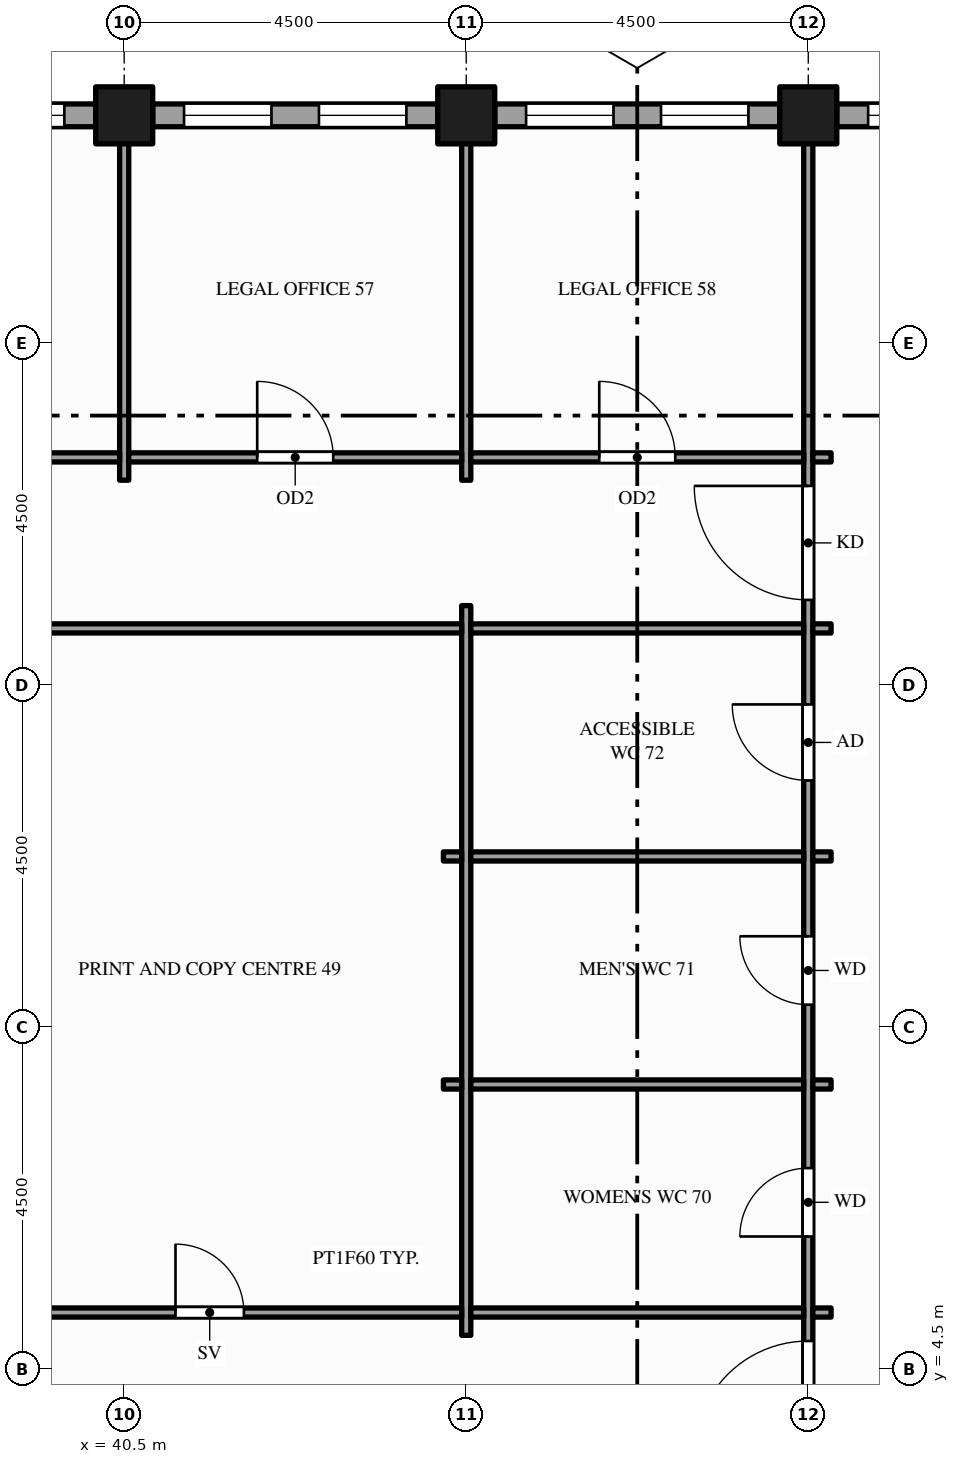
"""IFC4 building model, lengths in metres.
Left out: names, types, materials, properties, quantities, classifications, styles, units other than length and angle.
Written with IfcOpenShell. Run it as: python <this file> out.ifc"""

import sys

from ifc_helpers import new_model, si_unit, direction, frame, frame_2d, origin, origin_2d, place, context, subcontext, project, spatial, rectangle, hollow_rectangle, extrude, element, fill, save


model = new_model("IFC4")
c1 = context("Model", 3, precision=1e-05, world=origin(), true_north=direction((0.0, 1.0)))
c2 = subcontext(c1, "Body", "Model", "MODEL_VIEW")
j1 = project(units=[si_unit("LENGTHUNIT", "METRE"), si_unit("PLANEANGLEUNIT", "RADIAN")], contexts=[c1])
p1 = place(None, origin())
s1 = spatial("IfcSite", under=j1, at=p1, CompositionType="ELEMENT")
p2 = place(p1, origin())
s2 = spatial("IfcBuilding", under=s1, at=p2, CompositionType="ELEMENT")
p3 = place(p2, frame((0.0, 0.0, 223.0)))
s3 = spatial("IfcBuildingStorey", under=s2, at=p3, CompositionType="ELEMENT", Elevation=223.0)
for number, where, z_axis, x_axis in (
    (1, (40.5, 21.0, -0.15), (0.0, 0.0, 1.0), (1.0, 0.0, 0.0)),
    (2, (45.0, 21.0, -0.15), (0.0, 0.0, 1.0), (1.0, 0.0, 0.0)),
    (3, (49.5, 21.0, -0.15), (0.0, 0.0, 1.0), (1.0, 0.0, 0.0)),
):
    element("IfcColumn", number, at=place(p3, frame(where, z_axis=z_axis, x_axis=x_axis)), inside=s3, PredefinedType="COLUMN", context=c2, shape_type="SweptSolid", body=[
        extrude(hollow_rectangle(XDim=0.75, YDim=0.75, WallThickness=0.036, at=origin_2d()), origin(), (0.0, 0.0, 1.0), 4.0),
    ])
p4 = place(p3, frame((54.0, 21.0, 0.0), z_axis=(0.0, 0.0, 1.0), x_axis=(-1.0, 0.0, 0.0)))
e4 = element("IfcWall", 4, at=p4, inside=s3, PredefinedType="STANDARD", context=c2, shape_type="SweptSolid", body=[
    extrude(rectangle(XDim=4.125, YDim=0.3, at=frame_2d((2.062, 0.0))), origin(), (0.0, 0.0, 1.0), 2.87),
])
p5 = place(p4, frame((0.4, 0.0, 0.9)))
e5 = element("IfcOpeningElement", 5, at=p5, cuts=e4, PredefinedType="OPENING", context=c2, shape_type="SweptSolid", body=[
    extrude(rectangle(XDim=1.55, YDim=1.75, at=frame_2d((0.775, 0.875))), frame((0.0, 0.16, 0.0), z_axis=(0.0, -1.0, 0.0), x_axis=(1.0, 0.0, 0.0)), (0.0, 0.0, 1.0), 0.32),
])
p6 = place(p4, frame((2.562, 0.0, 0.9)))
e6 = element("IfcOpeningElement", 6, at=p6, cuts=e4, PredefinedType="OPENING", context=c2, shape_type="SweptSolid", body=[
    extrude(rectangle(XDim=1.15, YDim=1.75, at=frame_2d((0.575, 0.875))), frame((0.0, 0.16, 0.0), z_axis=(0.0, -1.0, 0.0), x_axis=(1.0, 0.0, 0.0)), (0.0, 0.0, 1.0), 0.32),
])
p7 = place(p3, frame((49.125, 21.0, 0.0), z_axis=(0.0, 0.0, 1.0), x_axis=(-1.0, 0.0, 0.0)))
e7 = element("IfcWall", 7, at=p7, inside=s3, PredefinedType="STANDARD", context=c2, shape_type="SweptSolid", body=[
    extrude(rectangle(XDim=3.75, YDim=0.3, at=frame_2d((1.875, 0.0))), origin(), (0.0, 0.0, 1.0), 2.87),
])
p8 = place(p7, frame((0.413, 0.0, 0.9)))
e8 = element("IfcOpeningElement", 8, at=p8, cuts=e7, PredefinedType="OPENING", context=c2, shape_type="SweptSolid", body=[
    extrude(rectangle(XDim=1.15, YDim=1.75, at=frame_2d((0.575, 0.875))), frame((0.0, 0.16, 0.0), z_axis=(0.0, -1.0, 0.0), x_axis=(1.0, 0.0, 0.0)), (0.0, 0.0, 1.0), 0.32),
])
p9 = place(p7, frame((2.188, 0.0, 0.9)))
e9 = element("IfcOpeningElement", 9, at=p9, cuts=e7, PredefinedType="OPENING", context=c2, shape_type="SweptSolid", body=[
    extrude(rectangle(XDim=1.15, YDim=1.75, at=frame_2d((0.575, 0.875))), frame((0.0, 0.16, 0.0), z_axis=(0.0, -1.0, 0.0), x_axis=(1.0, 0.0, 0.0)), (0.0, 0.0, 1.0), 0.32),
])
p10 = place(p3, frame((44.625, 21.0, 0.0), z_axis=(0.0, 0.0, 1.0), x_axis=(-1.0, 0.0, 0.0)))
e10 = element("IfcWall", 10, at=p10, inside=s3, PredefinedType="STANDARD", context=c2, shape_type="SweptSolid", body=[
    extrude(rectangle(XDim=3.75, YDim=0.3, at=frame_2d((1.875, 0.0))), origin(), (0.0, 0.0, 1.0), 2.87),
])
p11 = place(p10, frame((0.413, 0.0, 0.9)))
e11 = element("IfcOpeningElement", 11, at=p11, cuts=e10, PredefinedType="OPENING", context=c2, shape_type="SweptSolid", body=[
    extrude(rectangle(XDim=1.15, YDim=1.75, at=frame_2d((0.575, 0.875))), frame((0.0, 0.16, 0.0), z_axis=(0.0, -1.0, 0.0), x_axis=(1.0, 0.0, 0.0)), (0.0, 0.0, 1.0), 0.32),
])
p12 = place(p10, frame((2.188, 0.0, 0.9)))
e12 = element("IfcOpeningElement", 12, at=p12, cuts=e10, PredefinedType="OPENING", context=c2, shape_type="SweptSolid", body=[
    extrude(rectangle(XDim=1.15, YDim=1.75, at=frame_2d((0.575, 0.875))), frame((0.0, 0.16, 0.0), z_axis=(0.0, -1.0, 0.0), x_axis=(1.0, 0.0, 0.0)), (0.0, 0.0, 1.0), 0.32),
])
p13 = place(p3, frame((40.125, 21.0, 0.0), z_axis=(0.0, 0.0, 1.0), x_axis=(-1.0, 0.0, 0.0)))
e13 = element("IfcWall", 13, at=p13, inside=s3, PredefinedType="STANDARD", context=c2, shape_type="SweptSolid", body=[
    extrude(rectangle(XDim=3.75, YDim=0.3, at=frame_2d((1.875, 0.0))), origin(), (0.0, 0.0, 1.0), 2.87),
])
p14 = place(p13, frame((0.413, 0.0, 0.9)))
e14 = element("IfcOpeningElement", 14, at=p14, cuts=e13, PredefinedType="OPENING", context=c2, shape_type="SweptSolid", body=[
    extrude(rectangle(XDim=1.15, YDim=1.75, at=frame_2d((0.575, 0.875))), frame((0.0, 0.16, 0.0), z_axis=(0.0, -1.0, 0.0), x_axis=(1.0, 0.0, 0.0)), (0.0, 0.0, 1.0), 0.32),
])
p15 = place(p13, frame((2.188, 0.0, 0.9)))
e15 = element("IfcOpeningElement", 15, at=p15, cuts=e13, PredefinedType="OPENING", context=c2, shape_type="SweptSolid", body=[
    extrude(rectangle(XDim=1.15, YDim=1.75, at=frame_2d((0.575, 0.875))), frame((0.0, 0.16, 0.0), z_axis=(0.0, -1.0, 0.0), x_axis=(1.0, 0.0, 0.0)), (0.0, 0.0, 1.0), 0.32),
])
p16 = place(p3, frame((40.5, 16.2, 0.0), z_axis=(0.0, 0.0, 1.0), x_axis=(0.0, 1.0, 0.0)))
e16 = element("IfcWall", 16, at=p16, inside=s3, PredefinedType="PARTITIONING", context=c2, shape_type="SweptSolid", body=[
    extrude(rectangle(XDim=4.65, YDim=0.12, at=frame_2d((2.325, 0.0))), origin(), (0.0, 0.0, 1.0), 2.87),
])
p17 = place(p3, frame((45.0, 4.95, 0.0), z_axis=(0.0, 0.0, 1.0), x_axis=(0.0, 1.0, 0.0)))
e17 = element("IfcWall", 17, at=p17, inside=s3, PredefinedType="PARTITIONING", context=c2, shape_type="SweptSolid", body=[
    extrude(rectangle(XDim=9.6, YDim=0.12, at=frame_2d((4.8, 0.0))), origin(), (0.0, 0.0, 1.0), 2.87),
])
p18 = place(p3, frame((45.0, 16.2, 0.0), z_axis=(0.0, 0.0, 1.0), x_axis=(0.0, 1.0, 0.0)))
e18 = element("IfcWall", 18, at=p18, inside=s3, PredefinedType="PARTITIONING", context=c2, shape_type="SweptSolid", body=[
    extrude(rectangle(XDim=4.65, YDim=0.12, at=frame_2d((2.325, 0.0))), origin(), (0.0, 0.0, 1.0), 2.87),
])
p19 = place(p3, frame((49.5, -1.35, 0.0), z_axis=(0.0, 0.0, 1.0), x_axis=(0.0, 1.0, 0.0)))
e19 = element("IfcWall", 19, at=p19, inside=s3, PredefinedType="PARTITIONING", context=c2, shape_type="SweptSolid", body=[
    extrude(rectangle(XDim=22.2, YDim=0.12, at=frame_2d((11.1, 0.0))), origin(), (0.0, 0.0, 1.0), 2.87),
])
p20 = place(p19, frame((4.725, 0.0, 0.0)))
e20 = element("IfcOpeningElement", 20, at=p20, cuts=e19, PredefinedType="OPENING", context=c2, shape_type="SweptSolid", body=[
    extrude(rectangle(XDim=1.5, YDim=2.1, at=frame_2d((0.75, 1.05))), frame((0.0, 0.07, 0.0), z_axis=(0.0, -1.0, 0.0), x_axis=(1.0, 0.0, 0.0)), (0.0, 0.0, 1.0), 0.14),
])
p21 = place(p19, frame((15.975, 0.0, 0.0)))
e21 = element("IfcOpeningElement", 21, at=p21, cuts=e19, PredefinedType="OPENING", context=c2, shape_type="SweptSolid", body=[
    extrude(rectangle(XDim=1.5, YDim=2.1, at=frame_2d((0.75, 1.05))), frame((0.0, 0.07, 0.0), z_axis=(0.0, -1.0, 0.0), x_axis=(1.0, 0.0, 0.0)), (0.0, 0.0, 1.0), 0.14),
])
p22 = place(p19, frame((7.6, 0.0, 0.0)))
e22 = element("IfcOpeningElement", 22, at=p22, cuts=e19, PredefinedType="OPENING", context=c2, shape_type="SweptSolid", body=[
    extrude(rectangle(XDim=0.9, YDim=2.1, at=frame_2d((0.45, 1.05))), frame((0.0, 0.07, 0.0), z_axis=(0.0, -1.0, 0.0), x_axis=(1.0, 0.0, 0.0)), (0.0, 0.0, 1.0), 0.14),
])
p23 = place(p19, frame((10.65, 0.0, 0.0)))
e23 = element("IfcOpeningElement", 23, at=p23, cuts=e19, PredefinedType="OPENING", context=c2, shape_type="SweptSolid", body=[
    extrude(rectangle(XDim=0.9, YDim=2.1, at=frame_2d((0.45, 1.05))), frame((0.0, 0.07, 0.0), z_axis=(0.0, -1.0, 0.0), x_axis=(1.0, 0.0, 0.0)), (0.0, 0.0, 1.0), 0.14),
])
p24 = place(p19, frame((13.6, 0.0, 0.0)))
e24 = element("IfcOpeningElement", 24, at=p24, cuts=e19, PredefinedType="OPENING", context=c2, shape_type="SweptSolid", body=[
    extrude(rectangle(XDim=1.0, YDim=2.1, at=frame_2d((0.5, 1.05))), frame((0.0, 0.07, 0.0), z_axis=(0.0, -1.0, 0.0), x_axis=(1.0, 0.0, 0.0)), (0.0, 0.0, 1.0), 0.14),
])
p25 = place(p3, frame((38.31, 5.25, 0.0), z_axis=(0.0, 0.0, 1.0), x_axis=(1.0, 0.0, 0.0)))
e25 = element("IfcWall", 25, at=p25, inside=s3, PredefinedType="PARTITIONING", context=c2, shape_type="SweptSolid", body=[
    extrude(rectangle(XDim=6.63, YDim=0.12, at=frame_2d((3.315, 0.0))), origin(), (0.0, 0.0, 1.0), 2.87),
])
p26 = place(p25, frame((2.865, 0.0, 0.0)))
e26 = element("IfcOpeningElement", 26, at=p26, cuts=e25, PredefinedType="OPENING", context=c2, shape_type="SweptSolid", body=[
    extrude(rectangle(XDim=0.9, YDim=2.1, at=frame_2d((0.45, 1.05))), frame((0.0, 0.07, 0.0), z_axis=(0.0, -1.0, 0.0), x_axis=(1.0, 0.0, 0.0)), (0.0, 0.0, 1.0), 0.14),
])
p27 = place(p3, frame((45.06, 5.25, 0.0), z_axis=(0.0, 0.0, 1.0), x_axis=(1.0, 0.0, 0.0)))
e27 = element("IfcWall", 27, at=p27, inside=s3, PredefinedType="PARTITIONING", context=c2, shape_type="SweptSolid", body=[
    extrude(rectangle(XDim=4.38, YDim=0.12, at=frame_2d((2.19, 0.0))), origin(), (0.0, 0.0, 1.0), 2.87),
])
for number, where, z_axis, x_axis in (
    (28, (49.56, 5.25, 0.0), (0.0, 0.0, 1.0), (1.0, 0.0, 0.0)),
    (29, (44.7, 8.25, 0.0), (0.0, 0.0, 1.0), (1.0, 0.0, 0.0)),
):
    element("IfcWall", number, at=place(p3, frame(where, z_axis=z_axis, x_axis=x_axis)), inside=s3, PredefinedType="PARTITIONING", context=c2, shape_type="SweptSolid", body=[
        extrude(rectangle(XDim=0.24, YDim=0.12, at=frame_2d((0.12, 0.0))), origin(), (0.0, 0.0, 1.0), 2.87),
    ])
p28 = place(p3, frame((45.06, 8.25, 0.0), z_axis=(0.0, 0.0, 1.0), x_axis=(1.0, 0.0, 0.0)))
e30 = element("IfcWall", 30, at=p28, inside=s3, PredefinedType="PARTITIONING", context=c2, shape_type="SweptSolid", body=[
    extrude(rectangle(XDim=4.38, YDim=0.12, at=frame_2d((2.19, 0.0))), origin(), (0.0, 0.0, 1.0), 2.87),
])
for number, where, z_axis, x_axis in (
    (31, (49.56, 8.25, 0.0), (0.0, 0.0, 1.0), (1.0, 0.0, 0.0)),
    (32, (44.7, 11.25, 0.0), (0.0, 0.0, 1.0), (1.0, 0.0, 0.0)),
):
    element("IfcWall", number, at=place(p3, frame(where, z_axis=z_axis, x_axis=x_axis)), inside=s3, PredefinedType="PARTITIONING", context=c2, shape_type="SweptSolid", body=[
        extrude(rectangle(XDim=0.24, YDim=0.12, at=frame_2d((0.12, 0.0))), origin(), (0.0, 0.0, 1.0), 2.87),
    ])
p29 = place(p3, frame((45.06, 11.25, 0.0), z_axis=(0.0, 0.0, 1.0), x_axis=(1.0, 0.0, 0.0)))
e33 = element("IfcWall", 33, at=p29, inside=s3, PredefinedType="PARTITIONING", context=c2, shape_type="SweptSolid", body=[
    extrude(rectangle(XDim=4.38, YDim=0.12, at=frame_2d((2.19, 0.0))), origin(), (0.0, 0.0, 1.0), 2.87),
])
p30 = place(p3, frame((49.56, 11.25, 0.0), z_axis=(0.0, 0.0, 1.0), x_axis=(1.0, 0.0, 0.0)))
e34 = element("IfcWall", 34, at=p30, inside=s3, PredefinedType="PARTITIONING", context=c2, shape_type="SweptSolid", body=[
    extrude(rectangle(XDim=0.24, YDim=0.12, at=frame_2d((0.12, 0.0))), origin(), (0.0, 0.0, 1.0), 2.87),
])
p31 = place(p3, frame((38.31, 14.25, 0.0), z_axis=(0.0, 0.0, 1.0), x_axis=(1.0, 0.0, 0.0)))
e35 = element("IfcWall", 35, at=p31, inside=s3, PredefinedType="PARTITIONING", context=c2, shape_type="SweptSolid", body=[
    extrude(rectangle(XDim=6.63, YDim=0.12, at=frame_2d((3.315, 0.0))), origin(), (0.0, 0.0, 1.0), 2.87),
])
p32 = place(p3, frame((45.06, 14.25, 0.0), z_axis=(0.0, 0.0, 1.0), x_axis=(1.0, 0.0, 0.0)))
e36 = element("IfcWall", 36, at=p32, inside=s3, PredefinedType="PARTITIONING", context=c2, shape_type="SweptSolid", body=[
    extrude(rectangle(XDim=4.38, YDim=0.12, at=frame_2d((2.19, 0.0))), origin(), (0.0, 0.0, 1.0), 2.87),
])
p33 = place(p3, frame((49.56, 14.25, 0.0), z_axis=(0.0, 0.0, 1.0), x_axis=(1.0, 0.0, 0.0)))
e37 = element("IfcWall", 37, at=p33, inside=s3, PredefinedType="PARTITIONING", context=c2, shape_type="SweptSolid", body=[
    extrude(rectangle(XDim=0.24, YDim=0.12, at=frame_2d((0.12, 0.0))), origin(), (0.0, 0.0, 1.0), 2.87),
])
p34 = place(p3, frame((27.06, 16.5, 0.0), z_axis=(0.0, 0.0, 1.0), x_axis=(1.0, 0.0, 0.0)))
e38 = element("IfcWall", 38, at=p34, inside=s3, PredefinedType="PARTITIONING", context=c2, shape_type="SweptSolid", body=[
    extrude(rectangle(XDim=13.38, YDim=0.12, at=frame_2d((6.69, 0.0))), origin(), (0.0, 0.0, 1.0), 2.87),
])
p35 = place(p34, frame((5.79, 0.0, 0.0)))
e39 = element("IfcOpeningElement", 39, at=p35, cuts=e38, PredefinedType="OPENING", context=c2, shape_type="SweptSolid", body=[
    extrude(rectangle(XDim=1.8, YDim=2.1, at=frame_2d((0.9, 1.05))), frame((0.0, 0.07, 0.0), z_axis=(0.0, -1.0, 0.0), x_axis=(1.0, 0.0, 0.0)), (0.0, 0.0, 1.0), 0.14),
])
p36 = place(p3, frame((40.56, 16.5, 0.0), z_axis=(0.0, 0.0, 1.0), x_axis=(1.0, 0.0, 0.0)))
e40 = element("IfcWall", 40, at=p36, inside=s3, PredefinedType="PARTITIONING", context=c2, shape_type="SweptSolid", body=[
    extrude(rectangle(XDim=4.38, YDim=0.12, at=frame_2d((2.19, 0.0))), origin(), (0.0, 0.0, 1.0), 2.87),
])
p37 = place(p36, frame((1.69, 0.0, 0.0)))
e41 = element("IfcOpeningElement", 41, at=p37, cuts=e40, PredefinedType="OPENING", context=c2, shape_type="SweptSolid", body=[
    extrude(rectangle(XDim=1.0, YDim=2.1, at=frame_2d((0.5, 1.05))), frame((0.0, 0.07, 0.0), z_axis=(0.0, -1.0, 0.0), x_axis=(1.0, 0.0, 0.0)), (0.0, 0.0, 1.0), 0.14),
])
p38 = place(p3, frame((45.06, 16.5, 0.0), z_axis=(0.0, 0.0, 1.0), x_axis=(1.0, 0.0, 0.0)))
e42 = element("IfcWall", 42, at=p38, inside=s3, PredefinedType="PARTITIONING", context=c2, shape_type="SweptSolid", body=[
    extrude(rectangle(XDim=4.38, YDim=0.12, at=frame_2d((2.19, 0.0))), origin(), (0.0, 0.0, 1.0), 2.87),
])
p39 = place(p38, frame((1.69, 0.0, 0.0)))
e43 = element("IfcOpeningElement", 43, at=p39, cuts=e42, PredefinedType="OPENING", context=c2, shape_type="SweptSolid", body=[
    extrude(rectangle(XDim=1.0, YDim=2.1, at=frame_2d((0.5, 1.05))), frame((0.0, 0.07, 0.0), z_axis=(0.0, -1.0, 0.0), x_axis=(1.0, 0.0, 0.0)), (0.0, 0.0, 1.0), 0.14),
])
p40 = place(p3, frame((49.56, 16.5, 0.0), z_axis=(0.0, 0.0, 1.0), x_axis=(1.0, 0.0, 0.0)))
e44 = element("IfcWall", 44, at=p40, inside=s3, PredefinedType="PARTITIONING", context=c2, shape_type="SweptSolid", body=[
    extrude(rectangle(XDim=0.24, YDim=0.12, at=frame_2d((0.12, 0.0))), origin(), (0.0, 0.0, 1.0), 2.87),
])
p41 = place(p6, origin())
e45 = element("IfcWindow", 45, at=p41, inside=s3, PartitioningType="SINGLE_PANEL", PredefinedType="WINDOW", context=c2, shape_type="SweptSolid", body=[
    extrude(rectangle(XDim=1.15, YDim=1.75, at=frame_2d((0.575, 0.875))), frame((0.0, 0.03, 0.0), z_axis=(0.0, -1.0, 0.0), x_axis=(1.0, 0.0, 0.0)), (0.0, 0.0, 1.0), 0.06),
])
fill(e6, e45)
p42 = place(p8, origin())
e46 = element("IfcWindow", 46, at=p42, inside=s3, PartitioningType="SINGLE_PANEL", PredefinedType="WINDOW", context=c2, shape_type="SweptSolid", body=[
    extrude(rectangle(XDim=1.15, YDim=1.75, at=frame_2d((0.575, 0.875))), frame((0.0, 0.03, 0.0), z_axis=(0.0, -1.0, 0.0), x_axis=(1.0, 0.0, 0.0)), (0.0, 0.0, 1.0), 0.06),
])
fill(e8, e46)
p43 = place(p9, origin())
e47 = element("IfcWindow", 47, at=p43, inside=s3, PartitioningType="SINGLE_PANEL", PredefinedType="WINDOW", context=c2, shape_type="SweptSolid", body=[
    extrude(rectangle(XDim=1.15, YDim=1.75, at=frame_2d((0.575, 0.875))), frame((0.0, 0.03, 0.0), z_axis=(0.0, -1.0, 0.0), x_axis=(1.0, 0.0, 0.0)), (0.0, 0.0, 1.0), 0.06),
])
fill(e9, e47)
p44 = place(p11, origin())
e48 = element("IfcWindow", 48, at=p44, inside=s3, PartitioningType="SINGLE_PANEL", PredefinedType="WINDOW", context=c2, shape_type="SweptSolid", body=[
    extrude(rectangle(XDim=1.15, YDim=1.75, at=frame_2d((0.575, 0.875))), frame((0.0, 0.03, 0.0), z_axis=(0.0, -1.0, 0.0), x_axis=(1.0, 0.0, 0.0)), (0.0, 0.0, 1.0), 0.06),
])
fill(e11, e48)
p45 = place(p12, origin())
e49 = element("IfcWindow", 49, at=p45, inside=s3, PartitioningType="SINGLE_PANEL", PredefinedType="WINDOW", context=c2, shape_type="SweptSolid", body=[
    extrude(rectangle(XDim=1.15, YDim=1.75, at=frame_2d((0.575, 0.875))), frame((0.0, 0.03, 0.0), z_axis=(0.0, -1.0, 0.0), x_axis=(1.0, 0.0, 0.0)), (0.0, 0.0, 1.0), 0.06),
])
fill(e12, e49)
p46 = place(p14, origin())
e50 = element("IfcWindow", 50, at=p46, inside=s3, PartitioningType="SINGLE_PANEL", PredefinedType="WINDOW", context=c2, shape_type="SweptSolid", body=[
    extrude(rectangle(XDim=1.15, YDim=1.75, at=frame_2d((0.575, 0.875))), frame((0.0, 0.03, 0.0), z_axis=(0.0, -1.0, 0.0), x_axis=(1.0, 0.0, 0.0)), (0.0, 0.0, 1.0), 0.06),
])
fill(e14, e50)
p47 = place(p20, origin())
e51 = element("IfcDoor", 51, at=p47, inside=s3, OperationType="SINGLE_SWING_LEFT", PredefinedType="DOOR", context=c2, shape_type="SweptSolid", body=[
    extrude(rectangle(XDim=1.5, YDim=2.1, at=frame_2d((0.75, 1.05))), frame((0.0, 0.025, 0.0), z_axis=(0.0, -1.0, 0.0), x_axis=(1.0, 0.0, 0.0)), (0.0, 0.0, 1.0), 0.05),
])
fill(e20, e51)
p48 = place(p21, origin())
e52 = element("IfcDoor", 52, at=p48, inside=s3, OperationType="SINGLE_SWING_RIGHT", PredefinedType="DOOR", context=c2, shape_type="SweptSolid", body=[
    extrude(rectangle(XDim=1.5, YDim=2.1, at=frame_2d((0.75, 1.05))), frame((0.0, 0.025, 0.0), z_axis=(0.0, -1.0, 0.0), x_axis=(1.0, 0.0, 0.0)), (0.0, 0.0, 1.0), 0.05),
])
fill(e21, e52)
p49 = place(p26, origin())
e53 = element("IfcDoor", 53, at=p49, inside=s3, OperationType="SINGLE_SWING_LEFT", PredefinedType="DOOR", context=c2, shape_type="SweptSolid", body=[
    extrude(rectangle(XDim=0.9, YDim=2.1, at=frame_2d((0.45, 1.05))), frame((0.0, 0.025, 0.0), z_axis=(0.0, -1.0, 0.0), x_axis=(1.0, 0.0, 0.0)), (0.0, 0.0, 1.0), 0.05),
])
fill(e26, e53)
p50 = place(p22, origin())
e54 = element("IfcDoor", 54, at=p50, inside=s3, OperationType="SINGLE_SWING_LEFT", PredefinedType="DOOR", context=c2, shape_type="SweptSolid", body=[
    extrude(rectangle(XDim=0.9, YDim=2.1, at=frame_2d((0.45, 1.05))), frame((0.0, 0.025, 0.0), z_axis=(0.0, -1.0, 0.0), x_axis=(1.0, 0.0, 0.0)), (0.0, 0.0, 1.0), 0.05),
])
fill(e22, e54)
p51 = place(p23, origin())
e55 = element("IfcDoor", 55, at=p51, inside=s3, OperationType="SINGLE_SWING_RIGHT", PredefinedType="DOOR", context=c2, shape_type="SweptSolid", body=[
    extrude(rectangle(XDim=0.9, YDim=2.1, at=frame_2d((0.45, 1.05))), frame((0.0, 0.025, 0.0), z_axis=(0.0, -1.0, 0.0), x_axis=(1.0, 0.0, 0.0)), (0.0, 0.0, 1.0), 0.05),
])
fill(e23, e55)
p52 = place(p24, origin())
e56 = element("IfcDoor", 56, at=p52, inside=s3, OperationType="SINGLE_SWING_RIGHT", PredefinedType="DOOR", context=c2, shape_type="SweptSolid", body=[
    extrude(rectangle(XDim=1.0, YDim=2.1, at=frame_2d((0.5, 1.05))), frame((0.0, 0.025, 0.0), z_axis=(0.0, -1.0, 0.0), x_axis=(1.0, 0.0, 0.0)), (0.0, 0.0, 1.0), 0.05),
])
fill(e24, e56)
p53 = place(p37, origin())
e57 = element("IfcDoor", 57, at=p53, inside=s3, OperationType="SINGLE_SWING_LEFT", PredefinedType="DOOR", context=c2, shape_type="SweptSolid", body=[
    extrude(rectangle(XDim=1.0, YDim=2.1, at=frame_2d((0.5, 1.05))), frame((0.0, 0.025, 0.0), z_axis=(0.0, -1.0, 0.0), x_axis=(1.0, 0.0, 0.0)), (0.0, 0.0, 1.0), 0.05),
])
fill(e41, e57)
p54 = place(p39, origin())
e58 = element("IfcDoor", 58, at=p54, inside=s3, OperationType="SINGLE_SWING_LEFT", PredefinedType="DOOR", context=c2, shape_type="SweptSolid", body=[
    extrude(rectangle(XDim=1.0, YDim=2.1, at=frame_2d((0.5, 1.05))), frame((0.0, 0.025, 0.0), z_axis=(0.0, -1.0, 0.0), x_axis=(1.0, 0.0, 0.0)), (0.0, 0.0, 1.0), 0.05),
])
fill(e43, e58)
save(model, sys.argv[1])
